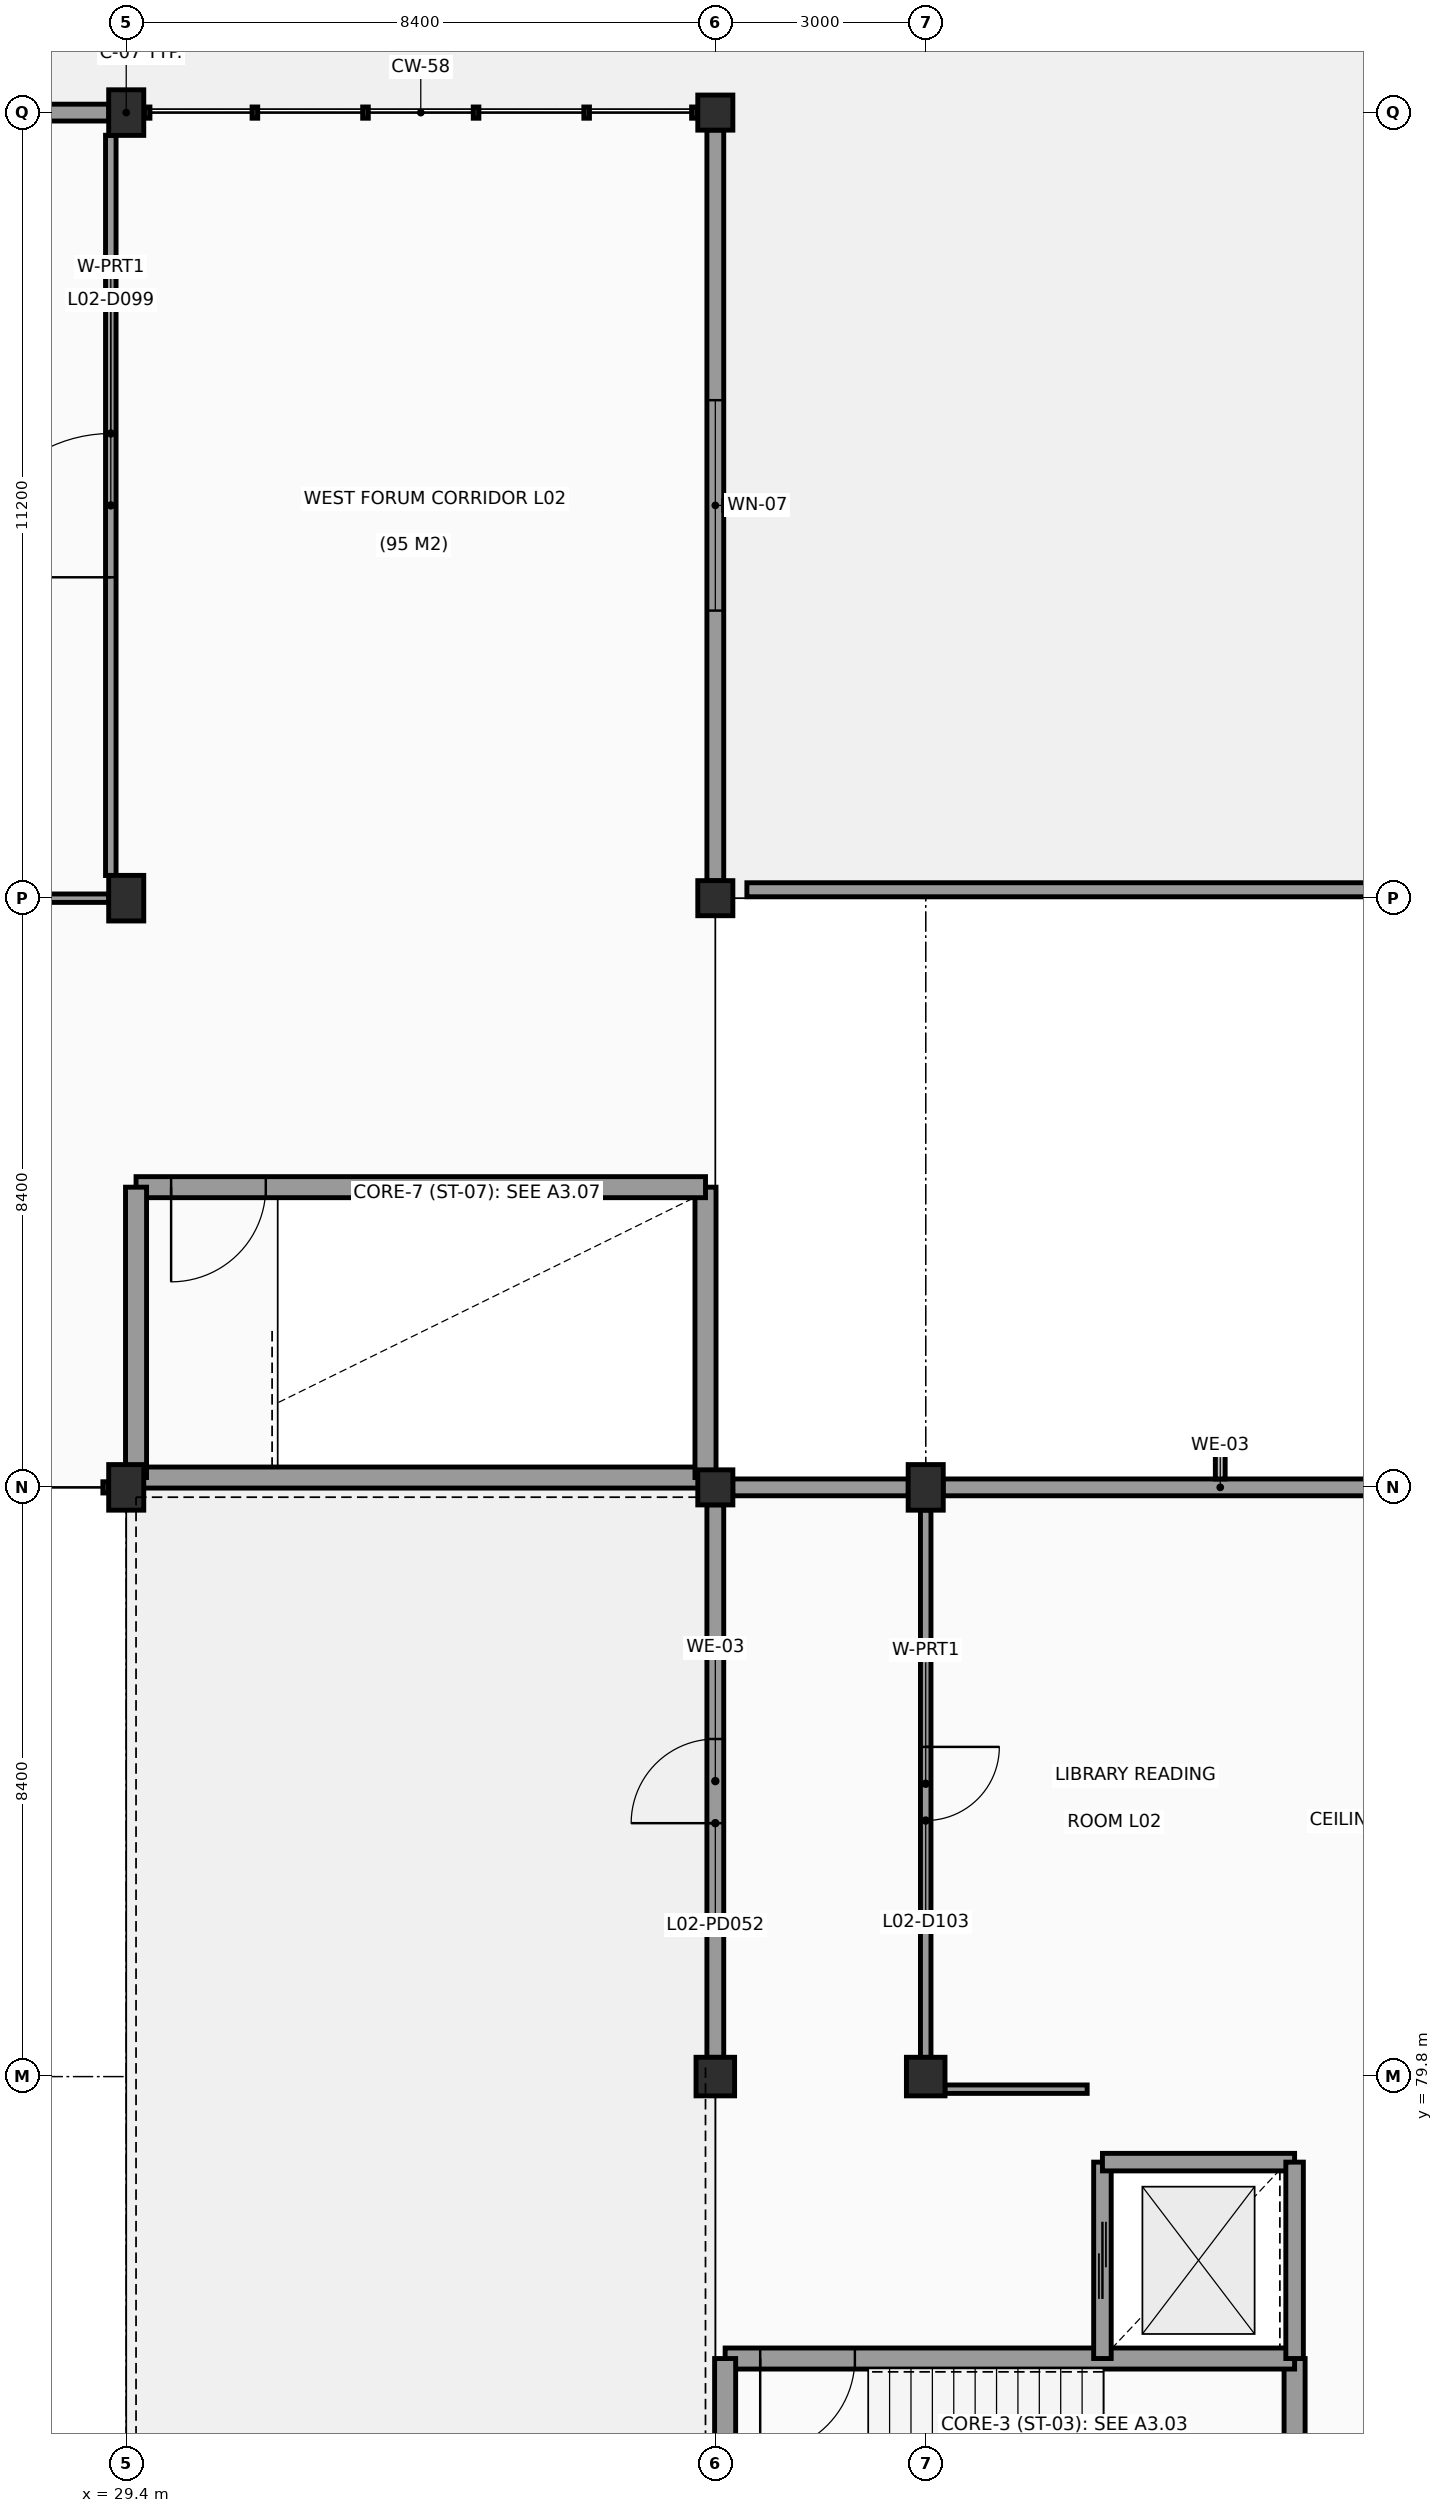
"""IFC4 building model, lengths in metres.
Left out: names, types, materials, properties, quantities, classifications, styles, units other than length and angle.
Written with IfcOpenShell. Run it as: python <this file> out.ifc"""

import sys

from ifc_helpers import new_model, si_unit, direction, frame, frame_2d, origin, origin_2d, place, context, subcontext, project, spatial, rectangle, extrude, element, fill, save


model = new_model("IFC4")
c1 = context("Model", 3, precision=1e-05, world=origin(), true_north=direction((0.0, 1.0)))
c2 = subcontext(c1, "Body", "Model", "MODEL_VIEW")
j1 = project(units=[si_unit("LENGTHUNIT", "METRE"), si_unit("PLANEANGLEUNIT", "RADIAN")], contexts=[c1])
p1 = place(None, origin())
s1 = spatial("IfcSite", under=j1, at=p1, CompositionType="ELEMENT")
p2 = place(p1, origin())
s2 = spatial("IfcBuilding", under=s1, at=p2, CompositionType="ELEMENT")
p3 = place(p2, frame((0.0, 0.0, 7.8)))
s3 = spatial("IfcBuildingStorey", under=s2, at=p3, CompositionType="ELEMENT", Elevation=7.8)
for number, where, z_axis, x_axis in (
    (1, (29.4, 88.2, 0.0), (0.0, 0.0, 1.0), (1.0, 0.0, 0.0)),
    (2, (29.4, 96.6, 0.0), (0.0, 0.0, 1.0), (1.0, 0.0, 0.0)),
):
    element("IfcColumn", number, at=place(p3, frame(where, z_axis=z_axis, x_axis=x_axis)), inside=s3, PredefinedType="COLUMN", context=c2, shape_type="SweptSolid", body=[
        extrude(rectangle(XDim=0.5, YDim=0.65, at=origin_2d()), origin(), (0.0, 0.0, 1.0), 3.34),
    ])
p4 = place(p3, frame((29.4, 107.8, 0.0), z_axis=(0.0, 0.0, 1.0), x_axis=(1.0, 0.0, 0.0)))
e3 = element("IfcColumn", 3, at=p4, inside=s3, PredefinedType="COLUMN", context=c2, shape_type="SweptSolid", body=[
    extrude(rectangle(XDim=0.5, YDim=0.65, at=origin_2d()), origin(), (0.0, 0.0, 1.0), 3.75),
])
p5 = place(p3, frame((37.8, 79.8, 0.0), z_axis=(0.0, 0.0, 1.0), x_axis=(1.0, 0.0, 0.0)))
e4 = element("IfcColumn", 4, at=p5, inside=s3, PredefinedType="COLUMN", context=c2, shape_type="SweptSolid", body=[
    extrude(rectangle(XDim=0.55, YDim=0.55, at=origin_2d()), origin(), (0.0, 0.0, 1.0), 3.6),
])
p6 = place(p3, frame((37.8, 88.2, 0.0), z_axis=(0.0, 0.0, 1.0), x_axis=(1.0, 0.0, 0.0)))
e5 = element("IfcColumn", 5, at=p6, inside=s3, PredefinedType="COLUMN", context=c2, shape_type="SweptSolid", body=[
    extrude(rectangle(XDim=0.5, YDim=0.5, at=origin_2d()), origin(), (0.0, 0.0, 1.0), 3.6),
])
p7 = place(p3, frame((37.8, 96.6, 0.0), z_axis=(0.0, 0.0, 1.0), x_axis=(1.0, 0.0, 0.0)))
e6 = element("IfcColumn", 6, at=p7, inside=s3, PredefinedType="COLUMN", context=c2, shape_type="SweptSolid", body=[
    extrude(rectangle(XDim=0.5, YDim=0.5, at=origin_2d()), origin(), (0.0, 0.0, 1.0), 3.34),
])
p8 = place(p3, frame((37.8, 107.8, 0.0), z_axis=(0.0, 0.0, 1.0), x_axis=(1.0, 0.0, 0.0)))
e7 = element("IfcColumn", 7, at=p8, inside=s3, PredefinedType="COLUMN", context=c2, shape_type="SweptSolid", body=[
    extrude(rectangle(XDim=0.5, YDim=0.5, at=origin_2d()), origin(), (0.0, 0.0, 1.0), 3.75),
])
p9 = place(p3, frame((40.8, 79.8, 0.0), z_axis=(0.0, 0.0, 1.0), x_axis=(1.0, 0.0, 0.0)))
e8 = element("IfcColumn", 8, at=p9, inside=s3, PredefinedType="COLUMN", context=c2, shape_type="SweptSolid", body=[
    extrude(rectangle(XDim=0.55, YDim=0.55, at=origin_2d()), origin(), (0.0, 0.0, 1.0), 3.6),
])
p10 = place(p3, frame((40.8, 88.2, 0.0), z_axis=(0.0, 0.0, 1.0), x_axis=(1.0, 0.0, 0.0)))
e9 = element("IfcColumn", 9, at=p10, inside=s3, PredefinedType="COLUMN", context=c2, shape_type="SweptSolid", body=[
    extrude(rectangle(XDim=0.5, YDim=0.65, at=origin_2d()), origin(), (0.0, 0.0, 1.0), 3.6),
])
p11 = place(p3, frame((37.8, 80.073, 0.0), z_axis=(0.0, 0.0, 1.0), x_axis=(0.0, 1.0, 0.0)))
e10 = element("IfcWall", 10, at=p11, inside=s3, PredefinedType="SOLIDWALL", context=c2, shape_type="SweptSolid", body=[
    extrude(rectangle(XDim=7.879, YDim=0.24, at=frame_2d((3.939, 0.0))), origin(), (0.0, 0.0, 1.0), 2.6),
])
p12 = place(p11, frame((3.34, 0.0, 0.0)))
e11 = element("IfcOpeningElement", 11, at=p12, cuts=e10, PredefinedType="OPENING", context=c2, shape_type="SweptSolid", body=[
    extrude(rectangle(XDim=1.2, YDim=2.15, at=frame_2d((0.6, 1.075))), frame((0.0, 0.13, 0.0), z_axis=(0.0, -1.0, 0.0), x_axis=(1.0, 0.0, 0.0)), (0.0, 0.0, 1.0), 0.26),
])
p13 = place(p3, frame((38.048, 88.2, 0.0), z_axis=(0.0, 0.0, 1.0), x_axis=(1.0, 0.0, 0.0)))
e12 = element("IfcWall", 12, at=p13, inside=s3, PredefinedType="SOLIDWALL", context=c2, shape_type="SweptSolid", body=[
    extrude(rectangle(XDim=2.504, YDim=0.24, at=frame_2d((1.252, 0.0))), origin(), (0.0, 0.0, 1.0), 2.6),
])
p14 = place(p3, frame((41.048, 88.2, 0.0), z_axis=(0.0, 0.0, 1.0), x_axis=(1.0, 0.0, 0.0)))
e13 = element("IfcWall", 13, at=p14, inside=s3, PredefinedType="SOLIDWALL", context=c2, shape_type="SweptSolid", body=[
    extrude(rectangle(XDim=7.904, YDim=0.24, at=frame_2d((3.952, 0.0))), origin(), (0.0, 0.0, 1.0), 2.6),
])
p15 = place(p3, frame((21.248, 107.8, 0.0), z_axis=(0.0, 0.0, 1.0), x_axis=(1.0, 0.0, 0.0)))
e14 = element("IfcWall", 14, at=p15, inside=s3, PredefinedType="SOLIDWALL", context=c2, shape_type="SweptSolid", body=[
    extrude(rectangle(XDim=7.904, YDim=0.24, at=frame_2d((3.952, 0.0))), origin(), (0.0, 0.0, 1.0), 3.34),
])
p16 = place(p15, frame((2.602, 0.0, 0.95)))
e15 = element("IfcOpeningElement", 15, at=p16, cuts=e14, PredefinedType="OPENING", context=c2, shape_type="SweptSolid", body=[
    extrude(rectangle(XDim=2.7, YDim=1.2, at=frame_2d((1.35, 0.6))), frame((0.0, 0.13, 0.0), z_axis=(0.0, -1.0, 0.0), x_axis=(1.0, 0.0, 0.0)), (0.0, 0.0, 1.0), 0.26),
])
p17 = place(p3, frame((37.8, 107.552, 0.0), z_axis=(0.0, 0.0, 1.0), x_axis=(0.0, -1.0, 0.0)))
e16 = element("IfcWall", 16, at=p17, inside=s3, PredefinedType="SOLIDWALL", context=c2, shape_type="SweptSolid", body=[
    extrude(rectangle(XDim=10.704, YDim=0.24, at=frame_2d((5.352, 0.0))), origin(), (0.0, 0.0, 1.0), 3.2),
])
p18 = place(p17, frame((3.852, 0.0, 0.95)))
e17 = element("IfcOpeningElement", 17, at=p18, cuts=e16, PredefinedType="OPENING", context=c2, shape_type="SweptSolid", body=[
    extrude(rectangle(XDim=3.0, YDim=1.2, at=frame_2d((1.5, 0.6))), frame((0.0, 0.13, 0.0), z_axis=(0.0, -1.0, 0.0), x_axis=(1.0, 0.0, 0.0)), (0.0, 0.0, 1.0), 0.26),
])
p19 = place(p3, frame((73.967, 96.72, 0.0), z_axis=(0.0, 0.0, 1.0), x_axis=(-1.0, 0.0, 0.0)))
e18 = element("IfcWall", 18, at=p19, inside=s3, PredefinedType="PARAPET", context=c2, shape_type="SweptSolid", body=[
    extrude(rectangle(XDim=35.717, YDim=0.2, at=frame_2d((17.858, 0.0))), origin(), (0.0, 0.0, 1.0), 1.1),
])
p20 = place(p3, frame((46.06, 71.54, 0.0), z_axis=(0.0, 0.0, 1.0), x_axis=(0.0, 1.0, 0.0)))
e19 = element("IfcWall", 19, at=p20, inside=s3, PredefinedType="SHEAR", context=c2, shape_type="SweptSolid", body=[
    extrude(rectangle(XDim=4.24, YDim=0.3, at=frame_2d((2.12, 0.0))), origin(), (0.0, 0.0, 1.0), 3.6),
])
p21 = place(p3, frame((46.06, 75.78, 0.0), z_axis=(0.0, 0.0, 1.0), x_axis=(-1.0, 0.0, 0.0)))
e20 = element("IfcWall", 20, at=p21, inside=s3, PredefinedType="SHEAR", context=c2, shape_type="SweptSolid", body=[
    extrude(rectangle(XDim=8.12, YDim=0.3, at=frame_2d((4.06, 0.0))), origin(), (0.0, 0.0, 1.0), 3.6),
])
p22 = place(p21, frame((6.27, 0.0, 0.0)))
e21 = element("IfcOpeningElement", 21, at=p22, cuts=e20, PredefinedType="OPENING", context=c2, shape_type="SweptSolid", body=[
    extrude(rectangle(XDim=1.35, YDim=2.15, at=frame_2d((0.675, 1.075))), frame((0.0, 0.16, 0.0), z_axis=(0.0, -1.0, 0.0), x_axis=(1.0, 0.0, 0.0)), (0.0, 0.0, 1.0), 0.32),
])
p23 = place(p3, frame((37.94, 75.78, 0.0), z_axis=(0.0, 0.0, 1.0), x_axis=(0.0, -1.0, 0.0)))
e22 = element("IfcWall", 22, at=p23, inside=s3, PredefinedType="SHEAR", context=c2, shape_type="SweptSolid", body=[
    extrude(rectangle(XDim=4.24, YDim=0.3, at=frame_2d((2.12, 0.0))), origin(), (0.0, 0.0, 1.0), 3.6),
])
p24 = place(p3, frame((43.32, 78.58, 0.0), z_axis=(0.0, 0.0, 1.0), x_axis=(0.0, -1.0, 0.0)))
e23 = element("IfcWall", 23, at=p24, inside=s3, PredefinedType="SHEAR", context=c2, shape_type="SweptSolid", body=[
    extrude(rectangle(XDim=2.8, YDim=0.25, at=frame_2d((1.4, 0.0))), origin(), (0.0, 0.0, 1.0), 3.6),
])
p25 = place(p24, frame((0.85, 0.0, 0.0)))
e24 = element("IfcOpeningElement", 24, at=p25, cuts=e23, PredefinedType="OPENING", context=c2, shape_type="SweptSolid", body=[
    extrude(rectangle(XDim=1.1, YDim=2.15, at=frame_2d((0.55, 1.075))), frame((0.0, 0.135, 0.0), z_axis=(0.0, -1.0, 0.0), x_axis=(1.0, 0.0, 0.0)), (0.0, 0.0, 1.0), 0.27),
])
p26 = place(p3, frame((46.06, 78.58, 0.0), z_axis=(0.0, 0.0, 1.0), x_axis=(-1.0, 0.0, 0.0)))
e25 = element("IfcWall", 25, at=p26, inside=s3, PredefinedType="SHEAR", context=c2, shape_type="SweptSolid", body=[
    extrude(rectangle(XDim=2.74, YDim=0.25, at=frame_2d((1.37, 0.0))), origin(), (0.0, 0.0, 1.0), 3.6),
])
p27 = place(p3, frame((46.06, 75.78, 0.0), z_axis=(0.0, 0.0, 1.0), x_axis=(0.0, 1.0, 0.0)))
e26 = element("IfcWall", 26, at=p27, inside=s3, PredefinedType="SHEAR", context=c2, shape_type="SweptSolid", body=[
    extrude(rectangle(XDim=2.8, YDim=0.25, at=frame_2d((1.4, 0.0))), origin(), (0.0, 0.0, 1.0), 3.6),
])
p28 = place(p3, frame((29.54, 88.34, 0.0), z_axis=(0.0, 0.0, 1.0), x_axis=(1.0, 0.0, 0.0)))
e27 = element("IfcWall", 27, at=p28, inside=s3, PredefinedType="SHEAR", context=c2, shape_type="SweptSolid", body=[
    extrude(rectangle(XDim=8.12, YDim=0.3, at=frame_2d((4.06, 0.0))), origin(), (0.0, 0.0, 1.0), 3.34),
])
p29 = place(p3, frame((37.66, 88.34, 0.0), z_axis=(0.0, 0.0, 1.0), x_axis=(0.0, 1.0, 0.0)))
e28 = element("IfcWall", 28, at=p29, inside=s3, PredefinedType="SHEAR", context=c2, shape_type="SweptSolid", body=[
    extrude(rectangle(XDim=4.14, YDim=0.3, at=frame_2d((2.07, 0.0))), origin(), (0.0, 0.0, 1.0), 3.34),
])
p30 = place(p3, frame((37.66, 92.48, 0.0), z_axis=(0.0, 0.0, 1.0), x_axis=(-1.0, 0.0, 0.0)))
e29 = element("IfcWall", 29, at=p30, inside=s3, PredefinedType="SHEAR", context=c2, shape_type="SweptSolid", body=[
    extrude(rectangle(XDim=8.12, YDim=0.3, at=frame_2d((4.06, 0.0))), origin(), (0.0, 0.0, 1.0), 3.34),
])
p31 = place(p30, frame((6.27, 0.0, 0.0)))
e30 = element("IfcOpeningElement", 30, at=p31, cuts=e29, PredefinedType="OPENING", context=c2, shape_type="SweptSolid", body=[
    extrude(rectangle(XDim=1.35, YDim=2.15, at=frame_2d((0.675, 1.075))), frame((0.0, 0.16, 0.0), z_axis=(0.0, -1.0, 0.0), x_axis=(1.0, 0.0, 0.0)), (0.0, 0.0, 1.0), 0.32),
])
p32 = place(p3, frame((29.54, 92.48, 0.0), z_axis=(0.0, 0.0, 1.0), x_axis=(0.0, -1.0, 0.0)))
e31 = element("IfcWall", 31, at=p32, inside=s3, PredefinedType="SHEAR", context=c2, shape_type="SweptSolid", body=[
    extrude(rectangle(XDim=4.14, YDim=0.3, at=frame_2d((2.07, 0.0))), origin(), (0.0, 0.0, 1.0), 3.34),
])
p33 = place(p3, frame((29.18, 107.477, 0.0), z_axis=(0.0, 0.0, 1.0), x_axis=(0.0, -1.0, 0.0)))
e32 = element("IfcWall", 32, at=p33, inside=s3, PredefinedType="PARTITIONING", context=c2, shape_type="SweptSolid", body=[
    extrude(rectangle(XDim=10.554, YDim=0.15, at=frame_2d((5.277, 0.0))), origin(), (0.0, 0.0, 1.0), 3.34),
])
p34 = place(p33, frame((4.252, 0.0, 0.0)))
e33 = element("IfcOpeningElement", 33, at=p34, cuts=e32, PredefinedType="OPENING", context=c2, shape_type="SweptSolid", body=[
    extrude(rectangle(XDim=2.05, YDim=2.35, at=frame_2d((1.025, 1.175))), frame((0.0, 0.085, 0.0), z_axis=(0.0, -1.0, 0.0), x_axis=(1.0, 0.0, 0.0)), (0.0, 0.0, 1.0), 0.17),
])
p35 = place(p3, frame((29.152, 96.6, 0.0), z_axis=(0.0, 0.0, 1.0), x_axis=(-1.0, 0.0, 0.0)))
e34 = element("IfcWall", 34, at=p35, inside=s3, PredefinedType="PARTITIONING", context=c2, shape_type="SweptSolid", body=[
    extrude(rectangle(XDim=7.904, YDim=0.12, at=frame_2d((3.952, 0.0))), origin(), (0.0, 0.0, 1.0), 3.34),
])
p36 = place(p3, frame((43.102, 79.62, 0.0), z_axis=(0.0, 0.0, 1.0), x_axis=(-1.0, 0.0, 0.0)))
e35 = element("IfcWall", 35, at=p36, inside=s3, PredefinedType="PARTITIONING", context=c2, shape_type="SweptSolid", body=[
    extrude(rectangle(XDim=2.029, YDim=0.12, at=frame_2d((1.015, 0.0))), origin(), (0.0, 0.0, 1.0), 2.91),
])
p37 = place(p3, frame((40.8, 80.073, 0.0), z_axis=(0.0, 0.0, 1.0), x_axis=(0.0, 1.0, 0.0)))
e36 = element("IfcWall", 36, at=p37, inside=s3, PredefinedType="PARTITIONING", context=c2, shape_type="SweptSolid", body=[
    extrude(rectangle(XDim=7.804, YDim=0.15, at=frame_2d((3.902, 0.0))), origin(), (0.0, 0.0, 1.0), 2.7),
])
p38 = place(p37, frame((3.377, 0.0, 0.0)))
e37 = element("IfcOpeningElement", 37, at=p38, cuts=e36, PredefinedType="OPENING", context=c2, shape_type="SweptSolid", body=[
    extrude(rectangle(XDim=1.05, YDim=2.15, at=frame_2d((0.525, 1.075))), frame((0.0, 0.085, 0.0), z_axis=(0.0, -1.0, 0.0), x_axis=(1.0, 0.0, 0.0)), (0.0, 0.0, 1.0), 0.17),
])
p39 = place(p12, origin())
e38 = element("IfcDoor", 38, at=p39, inside=s3, OperationType="SINGLE_SWING_LEFT", PredefinedType="DOOR", context=c2, shape_type="SweptSolid", body=[
    extrude(rectangle(XDim=1.2, YDim=2.15, at=frame_2d((0.6, 1.075))), frame((0.0, 0.025, 0.0), z_axis=(0.0, -1.0, 0.0), x_axis=(1.0, 0.0, 0.0)), (0.0, 0.0, 1.0), 0.05),
])
fill(e11, e38)
p40 = place(p18, origin())
e39 = element("IfcWindow", 39, at=p40, inside=s3, PartitioningType="SINGLE_PANEL", PredefinedType="WINDOW", context=c2, shape_type="SweptSolid", body=[
    extrude(rectangle(XDim=3.0, YDim=1.2, at=frame_2d((1.5, 0.6))), frame((0.0, 0.03, 0.0), z_axis=(0.0, -1.0, 0.0), x_axis=(1.0, 0.0, 0.0)), (0.0, 0.0, 1.0), 0.06),
])
fill(e17, e39)
p41 = place(p22, frame((1.35, 0.0, 0.0), z_axis=(0.0, 0.0, 1.0), x_axis=(-1.0, 0.0, 0.0)))
e40 = element("IfcDoor", 40, at=p41, inside=s3, OperationType="SINGLE_SWING_RIGHT", PredefinedType="DOOR", context=c2, shape_type="SweptSolid", body=[
    extrude(rectangle(XDim=1.35, YDim=2.15, at=frame_2d((0.675, 1.075))), frame((0.0, 0.025, 0.0), z_axis=(0.0, -1.0, 0.0), x_axis=(1.0, 0.0, 0.0)), (0.0, 0.0, 1.0), 0.05),
])
fill(e21, e40)
p42 = place(p25, origin())
e41 = element("IfcDoor", 41, at=p42, inside=s3, OperationType="DOUBLE_DOOR_SLIDING", PredefinedType="DOOR", context=c2, shape_type="SweptSolid", body=[
    extrude(rectangle(XDim=1.1, YDim=2.15, at=frame_2d((0.55, 1.075))), frame((0.0, 0.025, 0.0), z_axis=(0.0, -1.0, 0.0), x_axis=(1.0, 0.0, 0.0)), (0.0, 0.0, 1.0), 0.05),
])
fill(e24, e41)
p43 = place(p31, frame((1.35, 0.0, 0.0), z_axis=(0.0, 0.0, 1.0), x_axis=(-1.0, 0.0, 0.0)))
e42 = element("IfcDoor", 42, at=p43, inside=s3, OperationType="SINGLE_SWING_RIGHT", PredefinedType="DOOR", context=c2, shape_type="SweptSolid", body=[
    extrude(rectangle(XDim=1.35, YDim=2.15, at=frame_2d((0.675, 1.075))), frame((0.0, 0.025, 0.0), z_axis=(0.0, -1.0, 0.0), x_axis=(1.0, 0.0, 0.0)), (0.0, 0.0, 1.0), 0.05),
])
fill(e30, e42)
p44 = place(p34, origin())
e43 = element("IfcDoor", 43, at=p44, inside=s3, OperationType="DOUBLE_DOOR_SINGLE_SWING", PredefinedType="DOOR", context=c2, shape_type="SweptSolid", body=[
    extrude(rectangle(XDim=2.05, YDim=2.35, at=frame_2d((1.025, 1.175))), frame((0.0, 0.025, 0.0), z_axis=(0.0, -1.0, 0.0), x_axis=(1.0, 0.0, 0.0)), (0.0, 0.0, 1.0), 0.05),
])
fill(e33, e43)
p45 = place(p38, origin())
e44 = element("IfcDoor", 44, at=p45, inside=s3, OperationType="SINGLE_SWING_RIGHT", PredefinedType="DOOR", context=c2, shape_type="SweptSolid", body=[
    extrude(rectangle(XDim=1.05, YDim=2.15, at=frame_2d((0.525, 1.075))), frame((0.0, 0.025, 0.0), z_axis=(0.0, -1.0, 0.0), x_axis=(1.0, 0.0, 0.0)), (0.0, 0.0, 1.0), 0.05),
])
fill(e37, e44)
save(model, sys.argv[1])
